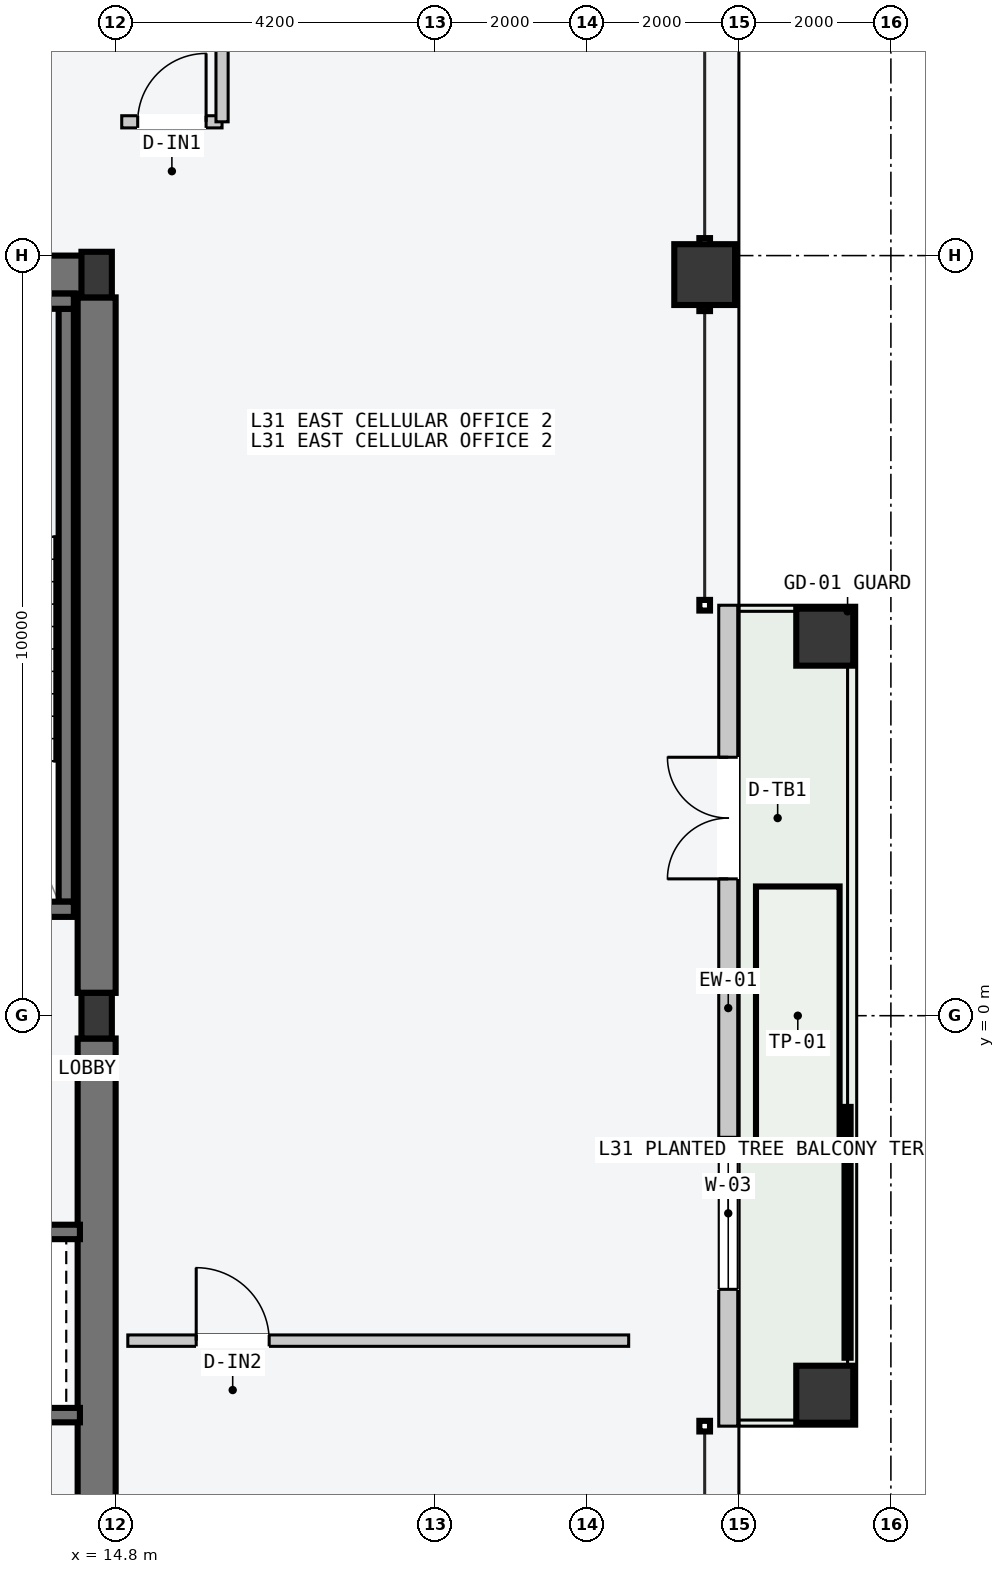
"""IFC4 building model, lengths in metres.
Left out: names, types, materials, properties, quantities, classifications, styles, units other than length and angle.
Written with IfcOpenShell. Run it as: python <this file> out.ifc"""

import sys

from ifc_helpers import new_model, si_unit, direction, frame, frame_2d, origin, origin_2d, place, context, subcontext, project, spatial, rectangle, hollow_rectangle, i_section, extrude, element, fill, save


model = new_model("IFC4")
c1 = context("Model", 3, precision=1e-05, world=origin(), true_north=direction((0.0, 1.0)))
c2 = subcontext(c1, "Body", "Model", "MODEL_VIEW")
j1 = project(units=[si_unit("LENGTHUNIT", "METRE"), si_unit("PLANEANGLEUNIT", "RADIAN")], contexts=[c1])
p1 = place(None, origin())
s1 = spatial("IfcSite", under=j1, at=p1, CompositionType="ELEMENT")
p2 = place(p1, origin())
s2 = spatial("IfcBuilding", under=s1, at=p2, CompositionType="ELEMENT")
p3 = place(p2, frame((0.0, 0.0, 120.6)))
s3 = spatial("IfcBuildingStorey", under=s2, at=p3, CompositionType="ELEMENT", Elevation=120.6)
p4 = place(p3, frame((8.07, 9.75, -0.2), z_axis=(0.0, 0.0, 1.0), x_axis=(1.0, 0.0, 0.0)))
e1 = element("IfcWall", 1, at=p4, inside=s3, PredefinedType="SHEAR", context=c2, shape_type="SweptSolid", body=[
    extrude(rectangle(XDim=6.46, YDim=0.5, at=frame_2d((3.23, 0.0))), origin(), (0.0, 0.0, 1.0), 3.6),
])
for number, where, z_axis, x_axis in (
    (2, (14.55, -9.45, -0.2), (0.0, 0.0, 1.0), (0.0, 1.0, 0.0)),
    (3, (14.55, 0.3, -0.2), (0.0, 0.0, 1.0), (0.0, 1.0, 0.0)),
):
    element("IfcWall", number, at=place(p3, frame(where, z_axis=z_axis, x_axis=x_axis)), inside=s3, PredefinedType="SHEAR", context=c2, shape_type="SweptSolid", body=[
        extrude(rectangle(XDim=9.15, YDim=0.5, at=frame_2d((4.575, 0.0))), origin(), (0.0, 0.0, 1.0), 3.6),
    ])
p5 = place(p3, frame((14.15, 1.5, -0.2), z_axis=(0.0, 0.0, 1.0), x_axis=(0.0, 1.0, 0.0)))
e4 = element("IfcWall", 4, at=p5, inside=s3, PredefinedType="SOLIDWALL", context=c2, shape_type="SweptSolid", body=[
    extrude(rectangle(XDim=7.8, YDim=0.2, at=frame_2d((3.9, 0.0))), origin(), (0.0, 0.0, 1.0), 3.6),
])
p6 = place(p3, frame((10.15, 1.4, -0.2), z_axis=(0.0, 0.0, 1.0), x_axis=(1.0, 0.0, 0.0)))
e5 = element("IfcWall", 5, at=p6, inside=s3, PredefinedType="SOLIDWALL", context=c2, shape_type="SweptSolid", body=[
    extrude(rectangle(XDim=4.1, YDim=0.2, at=frame_2d((2.05, 0.0))), origin(), (0.0, 0.0, 1.0), 3.6),
])
p7 = place(p6, frame((1.5, 0.0, 0.2)))
e6 = element("IfcOpeningElement", 6, at=p7, cuts=e5, PredefinedType="OPENING", context=c2, shape_type="SweptSolid", body=[
    extrude(rectangle(XDim=1.12, YDim=2.18, at=frame_2d((0.56, 1.09))), frame((0.0, 0.11, 0.0), z_axis=(0.0, -1.0, 0.0), x_axis=(1.0, 0.0, 0.0)), (0.0, 0.0, 1.0), 0.22),
])
p8 = place(p3, frame((10.15, 9.4, -0.2), z_axis=(0.0, 0.0, 1.0), x_axis=(1.0, 0.0, 0.0)))
e7 = element("IfcWall", 7, at=p8, inside=s3, PredefinedType="SOLIDWALL", context=c2, shape_type="SweptSolid", body=[
    extrude(rectangle(XDim=4.1, YDim=0.2, at=frame_2d((2.05, 0.0))), origin(), (0.0, 0.0, 1.0), 3.6),
])
for number, where, z_axis, x_axis in (
    (8, (14.55, 0.0, 0.0), (0.0, 0.0, 1.0), (1.0, 0.0, 0.0)),
    (9, (14.55, 9.75, 0.0), (0.0, 0.0, 1.0), (1.0, 0.0, 0.0)),
):
    element("IfcColumn", number, at=place(p3, frame(where, z_axis=z_axis, x_axis=x_axis)), inside=s3, PredefinedType="COLUMN", context=c2, shape_type="SweptSolid", body=[
        extrude(i_section(OverallWidth=0.4, OverallDepth=0.6, WebThickness=0.022, FlangeThickness=0.036, at=origin_2d()), origin(), (0.0, 0.0, 1.0), 3.6),
    ])
p9 = place(p3, frame((22.55, 9.75, 0.0), z_axis=(0.0, 0.0, 1.0), x_axis=(0.0, 1.0, 0.0)))
e10 = element("IfcColumn", 10, at=p9, inside=s3, PredefinedType="COLUMN", context=c2, shape_type="SweptSolid", body=[
    extrude(hollow_rectangle(XDim=0.8, YDim=0.8, WallThickness=0.036, at=origin_2d()), origin(), (0.0, 0.0, 1.0), 3.6),
])
for number, where, z_axis, x_axis in (
    (11, (24.13, -4.98, -0.2), (0.0, 0.0, 1.0), (0.0, 1.0, 0.0)),
    (12, (24.13, 4.98, -0.2), (0.0, 0.0, 1.0), (0.0, 1.0, 0.0)),
):
    element("IfcColumn", number, at=place(p3, frame(where, z_axis=z_axis, x_axis=x_axis)), inside=s3, PredefinedType="COLUMN", context=c2, shape_type="SweptSolid", body=[
        extrude(hollow_rectangle(XDim=0.75, YDim=0.75, WallThickness=0.032, at=origin_2d()), origin(), (0.0, 0.0, 1.0), 3.8),
    ])
p10 = place(p3, frame((22.86, -5.4, 0.0), z_axis=(0.0, 0.0, 1.0), x_axis=(0.0, 1.0, 0.0)))
e13 = element("IfcWall", 13, at=p10, inside=s3, PredefinedType="STANDARD", context=c2, shape_type="SweptSolid", body=[
    extrude(rectangle(XDim=10.8, YDim=0.25, at=frame_2d((5.4, 0.0))), origin(), (0.0, 0.0, 1.0), 3.4),
])
p11 = place(p10, frame((7.2, 0.0, 0.0)))
e14 = element("IfcOpeningElement", 14, at=p11, cuts=e13, PredefinedType="OPENING", context=c2, shape_type="SweptSolid", body=[
    extrude(rectangle(XDim=1.6, YDim=2.2, at=frame_2d((0.8, 1.1))), frame((0.0, 0.135, 0.0), z_axis=(0.0, -1.0, 0.0), x_axis=(1.0, 0.0, 0.0)), (0.0, 0.0, 1.0), 0.27),
])
p12 = place(p10, frame((1.8, 0.0, 0.85)))
e15 = element("IfcOpeningElement", 15, at=p12, cuts=e13, PredefinedType="OPENING", context=c2, shape_type="SweptSolid", body=[
    extrude(rectangle(XDim=2.0, YDim=2.1, at=frame_2d((1.0, 1.05))), frame((0.0, 0.135, 0.0), z_axis=(0.0, -1.0, 0.0), x_axis=(1.0, 0.0, 0.0)), (0.0, 0.0, 1.0), 0.27),
])
p13 = place(p3, frame((11.65, -2.845, -0.2), z_axis=(0.0, 0.0, 1.0), x_axis=(1.0, 0.0, 0.0)))
e16 = element("IfcWall", 16, at=p13, inside=s3, PredefinedType="SOLIDWALL", context=c2, shape_type="SweptSolid", body=[
    extrude(rectangle(XDim=2.68, YDim=0.19, at=frame_2d((1.34, 0.0))), origin(), (0.0, 0.0, 1.0), 3.6),
])
p14 = place(p13, frame((0.65, 0.0, 0.2)))
e17 = element("IfcOpeningElement", 17, at=p14, cuts=e16, PredefinedType="OPENING", context=c2, shape_type="SweptSolid", body=[
    extrude(rectangle(XDim=1.2, YDim=2.2, at=frame_2d((0.6, 1.1))), frame((0.0, 0.105, 0.0), z_axis=(0.0, -1.0, 0.0), x_axis=(1.0, 0.0, 0.0)), (0.0, 0.0, 1.0), 0.21),
])
p15 = place(p3, frame((11.65, -5.255, -0.2), z_axis=(0.0, 0.0, 1.0), x_axis=(1.0, 0.0, 0.0)))
e18 = element("IfcWall", 18, at=p15, inside=s3, PredefinedType="SOLIDWALL", context=c2, shape_type="SweptSolid", body=[
    extrude(rectangle(XDim=2.68, YDim=0.19, at=frame_2d((1.34, 0.0))), origin(), (0.0, 0.0, 1.0), 3.6),
])
p16 = place(p3, frame((14.88, 11.76, 0.0), z_axis=(0.0, 0.0, 1.0), x_axis=(1.0, 0.0, 0.0)))
e19 = element("IfcWall", 19, at=p16, inside=s3, PredefinedType="PARTITIONING", context=c2, shape_type="SweptSolid", body=[
    extrude(rectangle(XDim=1.32, YDim=0.16, at=frame_2d((0.66, 0.0))), origin(), (0.0, 0.0, 1.0), 3.4),
])
p17 = place(p16, frame((0.21, 0.0, 0.0)))
e20 = element("IfcOpeningElement", 20, at=p17, cuts=e19, PredefinedType="OPENING", context=c2, shape_type="SweptSolid", body=[
    extrude(rectangle(XDim=0.9, YDim=2.15, at=frame_2d((0.45, 1.075))), frame((0.0, 0.09, 0.0), z_axis=(0.0, -1.0, 0.0), x_axis=(1.0, 0.0, 0.0)), (0.0, 0.0, 1.0), 0.18),
])
p18 = place(p3, frame((16.2, 11.76, 0.0), z_axis=(0.0, 0.0, 1.0), x_axis=(0.0, 1.0, 0.0)))
e21 = element("IfcWall", 21, at=p18, inside=s3, PredefinedType="PARTITIONING", context=c2, shape_type="SweptSolid", body=[
    extrude(rectangle(XDim=1.95, YDim=0.16, at=frame_2d((0.975, 0.0))), origin(), (0.0, 0.0, 1.0), 3.4),
])
p19 = place(p3, frame((14.96, -4.275, 0.0), z_axis=(0.0, 0.0, 1.0), x_axis=(1.0, 0.0, 0.0)))
e22 = element("IfcWall", 22, at=p19, inside=s3, PredefinedType="PARTITIONING", context=c2, shape_type="SweptSolid", body=[
    extrude(rectangle(XDim=6.59, YDim=0.15, at=frame_2d((3.295, 0.0))), origin(), (0.0, 0.0, 1.0), 3.4),
])
p20 = place(p19, frame((0.9, 0.0, 0.0)))
e23 = element("IfcOpeningElement", 23, at=p20, cuts=e22, PredefinedType="OPENING", context=c2, shape_type="SweptSolid", body=[
    extrude(rectangle(XDim=0.96, YDim=2.18, at=frame_2d((0.48, 1.09))), frame((0.0, 0.085, 0.0), z_axis=(0.0, -1.0, 0.0), x_axis=(1.0, 0.0, 0.0)), (0.0, 0.0, 1.0), 0.17),
])
p21 = place(p11, origin())
e24 = element("IfcDoor", 24, at=p21, inside=s3, OperationType="DOUBLE_DOOR_SINGLE_SWING", PredefinedType="DOOR", context=c2, shape_type="SweptSolid", body=[
    extrude(rectangle(XDim=1.6, YDim=2.2, at=frame_2d((0.8, 1.1))), frame((0.0, 0.025, 0.0), z_axis=(0.0, -1.0, 0.0), x_axis=(1.0, 0.0, 0.0)), (0.0, 0.0, 1.0), 0.05),
])
fill(e14, e24)
p22 = place(p12, origin())
e25 = element("IfcWindow", 25, at=p22, inside=s3, PartitioningType="SINGLE_PANEL", PredefinedType="WINDOW", context=c2, shape_type="SweptSolid", body=[
    extrude(rectangle(XDim=2.0, YDim=2.1, at=frame_2d((1.0, 1.05))), frame((0.0, 0.03, 0.0), z_axis=(0.0, -1.0, 0.0), x_axis=(1.0, 0.0, 0.0)), (0.0, 0.0, 1.0), 0.06),
])
fill(e15, e25)
p23 = place(p17, origin())
e26 = element("IfcDoor", 26, at=p23, inside=s3, OperationType="SINGLE_SWING_RIGHT", PredefinedType="DOOR", context=c2, shape_type="SweptSolid", body=[
    extrude(rectangle(XDim=0.9, YDim=2.15, at=frame_2d((0.45, 1.075))), frame((0.0, 0.025, 0.0), z_axis=(0.0, -1.0, 0.0), x_axis=(1.0, 0.0, 0.0)), (0.0, 0.0, 1.0), 0.05),
])
fill(e20, e26)
p24 = place(p20, origin())
e27 = element("IfcDoor", 27, at=p24, inside=s3, OperationType="SINGLE_SWING_LEFT", PredefinedType="DOOR", context=c2, shape_type="SweptSolid", body=[
    extrude(rectangle(XDim=0.96, YDim=2.18, at=frame_2d((0.48, 1.09))), frame((0.0, 0.025, 0.0), z_axis=(0.0, -1.0, 0.0), x_axis=(1.0, 0.0, 0.0)), (0.0, 0.0, 1.0), 0.05),
])
fill(e23, e27)
save(model, sys.argv[1])
